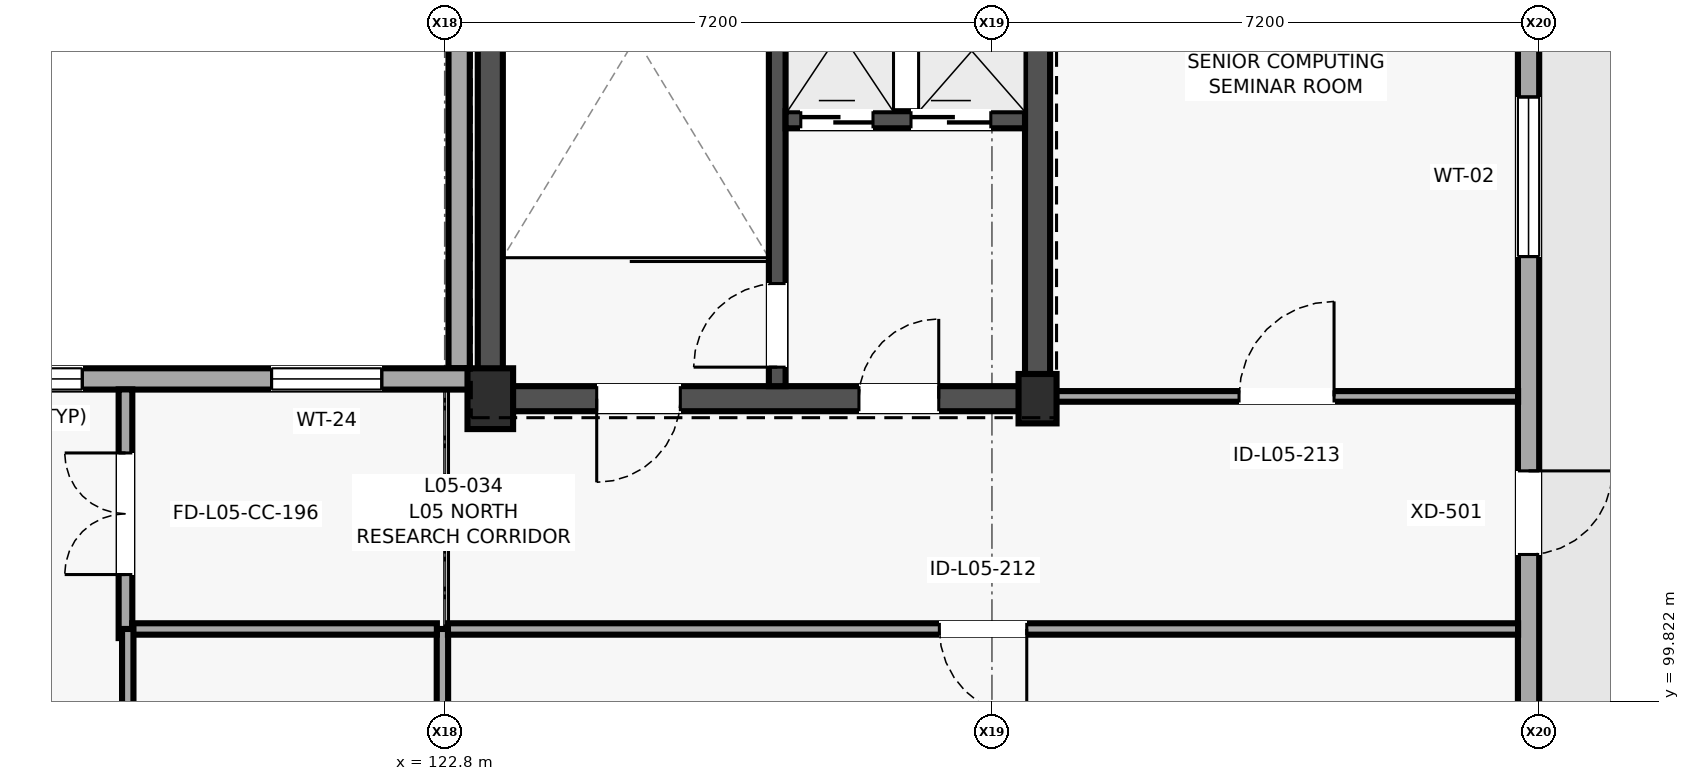
"""IFC4 building model, lengths in metres.
Left out: names, types, materials, properties, quantities, classifications, styles, units other than length and angle.
Written with IfcOpenShell. Run it as: python <this file> out.ifc"""

import sys

from ifc_helpers import new_model, si_unit, direction, frame, frame_2d, origin, origin_2d, place, context, subcontext, project, spatial, polyline, rectangle, outline, extrude, element, fill, save


model = new_model("IFC4")
c1 = context("Model", 3, precision=1e-05, world=origin(), true_north=direction((0.0, 1.0)))
c2 = subcontext(c1, "Body", "Model", "MODEL_VIEW")
j1 = project(units=[si_unit("LENGTHUNIT", "METRE"), si_unit("PLANEANGLEUNIT", "RADIAN")], contexts=[c1])
p1 = place(None, origin())
s1 = spatial("IfcSite", under=j1, at=p1, CompositionType="ELEMENT")
p2 = place(p1, origin())
s2 = spatial("IfcBuilding", under=s1, at=p2, CompositionType="ELEMENT")
p3 = place(p2, frame((0.0, 0.0, 20.2)))
s3 = spatial("IfcBuildingStorey", under=s2, at=p3, CompositionType="ELEMENT", Elevation=20.2)
p4 = place(p3, frame((123.4, 103.8, 0.0), z_axis=(0.0, 0.0, 1.0), x_axis=(1.0, 0.0, 0.0)))
e1 = element("IfcColumn", 1, at=p4, inside=s3, PredefinedType="COLUMN", context=c2, shape_type="SweptSolid", body=[
    extrude(rectangle(XDim=0.6, YDim=0.8, at=origin_2d()), origin(), (0.0, 0.0, 1.0), 4.0),
])
p5 = place(p3, frame((130.6, 103.8, 0.0), z_axis=(0.0, 0.0, 1.0), x_axis=(1.0, 0.0, 0.0)))
e2 = element("IfcColumn", 2, at=p5, inside=s3, PredefinedType="COLUMN", context=c2, shape_type="SweptSolid", body=[
    extrude(rectangle(XDim=0.5, YDim=0.65, at=origin_2d()), origin(), (0.0, 0.0, 1.0), 4.0),
])
p6 = place(p3, frame((137.06, 99.161, 0.0), z_axis=(0.0, 0.0, 1.0), x_axis=(0.0, 1.0, 0.0)))
e3 = element("IfcWall", 3, at=p6, inside=s3, PredefinedType="SOLIDWALL", context=c2, shape_type="SweptSolid", body=[
    extrude(rectangle(XDim=10.078, YDim=0.28, at=frame_2d((5.039, 0.0))), origin(), (0.0, 0.0, 1.0), 3.78),
])
p7 = place(p6, frame((2.589, 0.0, 0.0)))
e4 = element("IfcOpeningElement", 4, at=p7, cuts=e3, PredefinedType="OPENING", context=c2, shape_type="SweptSolid", body=[
    extrude(rectangle(XDim=1.1, YDim=2.15, at=frame_2d((0.55, 1.075))), frame((0.0, 0.15, 0.0), z_axis=(0.0, -1.0, 0.0), x_axis=(1.0, 0.0, 0.0)), (0.0, 0.0, 1.0), 0.3),
])
p8 = place(p6, frame((6.509, 0.0, 0.85)))
e5 = element("IfcOpeningElement", 5, at=p8, cuts=e3, PredefinedType="OPENING", context=c2, shape_type="SweptSolid", body=[
    extrude(rectangle(XDim=2.1, YDim=1.8, at=frame_2d((1.05, 0.9))), frame((0.0, 0.15, 0.0), z_axis=(0.0, -1.0, 0.0), x_axis=(1.0, 0.0, 0.0)), (0.0, 0.0, 1.0), 0.3),
])
p9 = place(p3, frame((122.99, 111.72, 0.0), z_axis=(0.0, 0.0, 1.0), x_axis=(0.0, -1.0, 0.0)))
e6 = element("IfcWall", 6, at=p9, inside=s3, PredefinedType="SOLIDWALL", context=c2, shape_type="SweptSolid", body=[
    extrude(rectangle(XDim=7.52, YDim=0.28, at=frame_2d((3.76, 0.0))), origin(), (0.0, 0.0, 1.0), 3.78),
])
p10 = place(p3, frame((123.13, 104.06, 0.0), z_axis=(0.0, 0.0, 1.0), x_axis=(-1.0, 0.0, 0.0)))
e7 = element("IfcWall", 7, at=p10, inside=s3, PredefinedType="SOLIDWALL", context=c2, shape_type="SweptSolid", body=[
    extrude(rectangle(XDim=7.53, YDim=0.28, at=frame_2d((3.765, 0.0))), origin(), (0.0, 0.0, 1.0), 3.78),
])
p11 = place(p10, frame((1.158, 0.0, 0.85)))
e8 = element("IfcOpeningElement", 8, at=p11, cuts=e7, PredefinedType="OPENING", context=c2, shape_type="SweptSolid", body=[
    extrude(rectangle(XDim=1.45, YDim=1.7, at=frame_2d((0.725, 0.85))), frame((0.0, 0.15, 0.0), z_axis=(0.0, -1.0, 0.0), x_axis=(1.0, 0.0, 0.0)), (0.0, 0.0, 1.0), 0.3),
])
p12 = place(p10, frame((5.098, 0.0, 0.75)))
e9 = element("IfcOpeningElement", 9, at=p12, cuts=e7, PredefinedType="OPENING", context=c2, shape_type="SweptSolid", body=[
    extrude(rectangle(XDim=1.1, YDim=2.1, at=frame_2d((0.55, 1.05))), frame((0.0, 0.15, 0.0), z_axis=(0.0, -1.0, 0.0), x_axis=(1.0, 0.0, 0.0)), (0.0, 0.0, 1.0), 0.3),
])
p13 = place(p3, frame((122.702, 80.045, 4.0), z_axis=(0.0, 0.0, 1.0), x_axis=(0.0, 1.0, 0.0)))
e10 = element("IfcWall", 10, at=p13, inside=s3, PredefinedType="PARAPET", context=c2, shape_type="SweptSolid", body=[
    extrude(outline(polyline([(0.0, 0.0), (23.96, 0.0), (23.96, 1.12), (16.293, 1.12), (16.243, 1.46), (7.717, 1.46), (7.667, 1.12), (0.0, 1.12), (0.0, 0.0)])), frame((0.0, 0.098, 0.0), z_axis=(0.0, -1.0, 0.0), x_axis=(1.0, 0.0, 0.0)), (0.0, 0.0, 1.0), 0.195),
])
p14 = place(p3, frame((122.799, 104.102, 4.0), z_axis=(0.0, 0.0, 1.0), x_axis=(-1.0, 0.0, 0.0)))
e11 = element("IfcWall", 11, at=p14, inside=s3, PredefinedType="PARAPET", context=c2, shape_type="SweptSolid", body=[
    extrude(rectangle(XDim=7.199, YDim=0.195, at=frame_2d((3.6, 0.0))), origin(), (0.0, 0.0, 1.0), 1.12),
])
p15 = place(p3, frame((137.102, 99.161, 4.0), z_axis=(0.0, 0.0, 1.0), x_axis=(0.0, 1.0, 0.0)))
e12 = element("IfcWall", 12, at=p15, inside=s3, PredefinedType="PARAPET", context=c2, shape_type="SweptSolid", body=[
    extrude(outline(polyline([(0.0, 0.0), (10.078, 0.0), (10.078, 1.12), (6.853, 1.12), (6.803, 1.46), (3.275, 1.46), (3.225, 1.12), (0.0, 1.12), (0.0, 0.0)])), frame((0.0, 0.098, 0.0), z_axis=(0.0, -1.0, 0.0), x_axis=(1.0, 0.0, 0.0)), (0.0, 0.0, 1.0), 0.195),
])
p16 = place(p3, frame((122.948, 111.805, 4.0), z_axis=(0.0, 0.0, 1.0), x_axis=(0.0, -1.0, 0.0)))
e13 = element("IfcWall", 13, at=p16, inside=s3, PredefinedType="PARAPET", context=c2, shape_type="SweptSolid", body=[
    extrude(outline(polyline([(0.0, 0.0), (15.209, 0.0), (15.209, 1.12), (10.342, 1.12), (10.292, 1.46), (4.917, 1.46), (4.867, 1.12), (0.0, 1.12), (0.0, 0.0)])), frame((0.0, 0.098, 0.0), z_axis=(0.0, -1.0, 0.0), x_axis=(1.0, 0.0, 0.0)), (0.0, 0.0, 1.0), 0.195),
])
p17 = place(p3, frame((123.235, 103.8, 0.0), z_axis=(0.0, 0.0, 1.0), x_axis=(1.0, 0.0, 0.0)))
e14 = element("IfcWall", 14, at=p17, inside=s3, PredefinedType="SHEAR", context=c2, shape_type="SweptSolid", body=[
    extrude(rectangle(XDim=7.53, YDim=0.33, at=frame_2d((3.765, 0.0))), origin(), (0.0, 0.0, 1.0), 4.0),
])
p18 = place(p17, frame((5.015, 0.0, 0.0)))
e15 = element("IfcOpeningElement", 15, at=p18, cuts=e14, PredefinedType="OPENING", context=c2, shape_type="SweptSolid", body=[
    extrude(rectangle(XDim=1.05, YDim=2.15, at=frame_2d((0.525, 1.075))), frame((0.0, 0.175, 0.0), z_axis=(0.0, -1.0, 0.0), x_axis=(1.0, 0.0, 0.0)), (0.0, 0.0, 1.0), 0.35),
])
p19 = place(p17, frame((1.565, 0.0, 0.0)))
e16 = element("IfcOpeningElement", 16, at=p19, cuts=e14, PredefinedType="OPENING", context=c2, shape_type="SweptSolid", body=[
    extrude(rectangle(XDim=1.1, YDim=2.15, at=frame_2d((0.55, 1.075))), frame((0.0, 0.175, 0.0), z_axis=(0.0, -1.0, 0.0), x_axis=(1.0, 0.0, 0.0)), (0.0, 0.0, 1.0), 0.35),
])
for number, where, z_axis, x_axis in (
    (17, (123.4, 103.965, 0.0), (0.0, 0.0, 1.0), (0.0, 1.0, 0.0)),
    (18, (130.6, 103.965, 0.0), (0.0, 0.0, 1.0), (0.0, 1.0, 0.0)),
):
    element("IfcWall", number, at=place(p3, frame(where, z_axis=z_axis, x_axis=x_axis)), inside=s3, PredefinedType="SHEAR", context=c2, shape_type="SweptSolid", body=[
        extrude(rectangle(XDim=7.47, YDim=0.33, at=frame_2d((3.735, 0.0))), origin(), (0.0, 0.0, 1.0), 4.0),
    ])
p20 = place(p3, frame((127.175, 103.965, 0.0), z_axis=(0.0, 0.0, 1.0), x_axis=(0.0, 1.0, 0.0)))
e19 = element("IfcWall", 19, at=p20, inside=s3, PredefinedType="SHEAR", context=c2, shape_type="SweptSolid", body=[
    extrude(rectangle(XDim=7.47, YDim=0.22, at=frame_2d((3.735, 0.0))), origin(), (0.0, 0.0, 1.0), 4.0),
])
p21 = place(p20, frame((0.25, 0.0, 0.0)))
e20 = element("IfcOpeningElement", 20, at=p21, cuts=e19, PredefinedType="OPENING", context=c2, shape_type="SweptSolid", body=[
    extrude(rectangle(XDim=1.1, YDim=2.15, at=frame_2d((0.55, 1.075))), frame((0.0, 0.12, 0.0), z_axis=(0.0, -1.0, 0.0), x_axis=(1.0, 0.0, 0.0)), (0.0, 0.0, 1.0), 0.24),
])
p22 = place(p3, frame((127.285, 107.47, 0.0), z_axis=(0.0, 0.0, 1.0), x_axis=(1.0, 0.0, 0.0)))
e21 = element("IfcWall", 21, at=p22, inside=s3, PredefinedType="SHEAR", context=c2, shape_type="SweptSolid", body=[
    extrude(rectangle(XDim=3.15, YDim=0.225, at=frame_2d((1.575, 0.0))), origin(), (0.0, 0.0, 1.0), 4.0),
])
p23 = place(p22, frame((0.2, 0.0, 0.0)))
e22 = element("IfcOpeningElement", 22, at=p23, cuts=e21, PredefinedType="OPENING", context=c2, shape_type="SweptSolid", body=[
    extrude(rectangle(XDim=0.95, YDim=2.15, at=frame_2d((0.475, 1.075))), frame((0.0, 0.123, 0.0), z_axis=(0.0, -1.0, 0.0), x_axis=(1.0, 0.0, 0.0)), (0.0, 0.0, 1.0), 0.245),
])
p24 = place(p22, frame((1.65, 0.0, 0.0)))
e23 = element("IfcOpeningElement", 23, at=p24, cuts=e21, PredefinedType="OPENING", context=c2, shape_type="SweptSolid", body=[
    extrude(rectangle(XDim=1.05, YDim=2.2, at=frame_2d((0.525, 1.1))), frame((0.0, 0.123, 0.0), z_axis=(0.0, -1.0, 0.0), x_axis=(1.0, 0.0, 0.0)), (0.0, 0.0, 1.0), 0.245),
])
p25 = place(p3, frame((126.955, 107.41, 4.0), z_axis=(0.0, 0.0, 1.0), x_axis=(1.0, 0.0, 0.0)))
e24 = element("IfcWall", 24, at=p25, inside=s3, PredefinedType="SHEAR", context=c2, shape_type="SweptSolid", body=[
    extrude(rectangle(XDim=3.81, YDim=0.33, at=frame_2d((1.905, 0.0))), origin(), (0.0, 0.0, 1.0), 0.96),
])
for number, where, z_axis, x_axis in (
    (25, (127.12, 107.575, 4.0), (0.0, 0.0, 1.0), (0.0, 1.0, 0.0)),
    (26, (130.6, 107.575, 4.0), (0.0, 0.0, 1.0), (0.0, 1.0, 0.0)),
):
    element("IfcWall", number, at=place(p3, frame(where, z_axis=z_axis, x_axis=x_axis)), inside=s3, PredefinedType="SHEAR", context=c2, shape_type="SweptSolid", body=[
        extrude(rectangle(XDim=3.86, YDim=0.33, at=frame_2d((1.93, 0.0))), origin(), (0.0, 0.0, 1.0), 0.96),
    ])
p26 = place(p3, frame((118.6, 100.65, 0.0), z_axis=(0.0, 0.0, 1.0), x_axis=(0.0, 1.0, 0.0)))
e27 = element("IfcWall", 27, at=p26, inside=s3, PredefinedType="PARTITIONING", context=c2, shape_type="SweptSolid", body=[
    extrude(rectangle(XDim=3.272, YDim=0.18, at=frame_2d((1.636, 0.0))), origin(), (0.0, 0.0, 1.0), 3.78),
])
p27 = place(p26, frame((0.836, 0.0, 0.0)))
e28 = element("IfcOpeningElement", 28, at=p27, cuts=e27, PredefinedType="OPENING", context=c2, shape_type="SweptSolid", body=[
    extrude(rectangle(XDim=1.6, YDim=2.25, at=frame_2d((0.8, 1.125))), frame((0.0, 0.1, 0.0), z_axis=(0.0, -1.0, 0.0), x_axis=(1.0, 0.0, 0.0)), (0.0, 0.0, 1.0), 0.2),
])
p28 = place(p3, frame((122.77, 96.678, 0.0), z_axis=(0.0, 0.0, 1.0), x_axis=(0.0, 1.0, 0.0)))
e29 = element("IfcWall", 29, at=p28, inside=s3, PredefinedType="PARTITIONING", context=c2, shape_type="SweptSolid", body=[
    extrude(rectangle(XDim=4.092, YDim=0.15, at=frame_2d((2.046, 0.0))), origin(), (0.0, 0.0, 1.0), 3.755),
])
p29 = place(p3, frame((122.697, 100.77, 0.0), z_axis=(0.0, 0.0, 1.0), x_axis=(-1.0, 0.0, 0.0)))
e30 = element("IfcWall", 30, at=p29, inside=s3, PredefinedType="PARTITIONING", context=c2, shape_type="SweptSolid", body=[
    extrude(rectangle(XDim=4.009, YDim=0.15, at=frame_2d((2.004, 0.0))), origin(), (0.0, 0.0, 1.0), 3.755),
])
p30 = place(p3, frame((118.63, 100.77, 0.0), z_axis=(0.0, 0.0, 1.0), x_axis=(0.0, -1.0, 0.0)))
e31 = element("IfcWall", 31, at=p30, inside=s3, PredefinedType="PARTITIONING", context=c2, shape_type="SweptSolid", body=[
    extrude(rectangle(XDim=10.922, YDim=0.15, at=frame_2d((5.461, 0.0))), origin(), (0.0, 0.0, 1.0), 3.205),
])
p31 = place(p30, frame((4.886, 0.0, 0.0)))
e32 = element("IfcOpeningElement", 32, at=p31, cuts=e31, PredefinedType="OPENING", context=c2, shape_type="SweptSolid", body=[
    extrude(rectangle(XDim=1.15, YDim=2.2, at=frame_2d((0.575, 1.1))), frame((0.0, 0.085, 0.0), z_axis=(0.0, -1.0, 0.0), x_axis=(1.0, 0.0, 0.0)), (0.0, 0.0, 1.0), 0.17),
])
p32 = place(p3, frame((136.922, 100.77, 0.0), z_axis=(0.0, 0.0, 1.0), x_axis=(-1.0, 0.0, 0.0)))
e33 = element("IfcWall", 33, at=p32, inside=s3, PredefinedType="PARTITIONING", context=c2, shape_type="SweptSolid", body=[
    extrude(rectangle(XDim=14.079, YDim=0.15, at=frame_2d((7.04, 0.0))), origin(), (0.0, 0.0, 1.0), 3.755),
])
p33 = place(p32, frame((6.464, 0.0, 0.0)))
e34 = element("IfcOpeningElement", 34, at=p33, cuts=e33, PredefinedType="OPENING", context=c2, shape_type="SweptSolid", body=[
    extrude(rectangle(XDim=1.15, YDim=2.2, at=frame_2d((0.575, 1.1))), frame((0.0, 0.085, 0.0), z_axis=(0.0, -1.0, 0.0), x_axis=(1.0, 0.0, 0.0)), (0.0, 0.0, 1.0), 0.17),
])
p34 = place(p3, frame((130.83, 103.83, 0.0), z_axis=(0.0, 0.0, 1.0), x_axis=(1.0, 0.0, 0.0)))
e35 = element("IfcWall", 35, at=p34, inside=s3, PredefinedType="PARTITIONING", context=c2, shape_type="SweptSolid", body=[
    extrude(rectangle(XDim=6.092, YDim=0.14, at=frame_2d((3.046, 0.0))), origin(), (0.0, 0.0, 1.0), 3.755),
])
p35 = place(p34, frame((2.421, 0.0, 0.0)))
e36 = element("IfcOpeningElement", 36, at=p35, cuts=e35, PredefinedType="OPENING", context=c2, shape_type="SweptSolid", body=[
    extrude(rectangle(XDim=1.25, YDim=2.22, at=frame_2d((0.625, 1.11))), frame((0.0, 0.08, 0.0), z_axis=(0.0, -1.0, 0.0), x_axis=(1.0, 0.0, 0.0)), (0.0, 0.0, 1.0), 0.16),
])
p36 = place(p7, frame((1.1, 0.0, 0.0), z_axis=(0.0, 0.0, 1.0), x_axis=(-1.0, 0.0, 0.0)))
e37 = element("IfcDoor", 37, at=p36, inside=s3, OperationType="SINGLE_SWING_RIGHT", PredefinedType="DOOR", context=c2, shape_type="SweptSolid", body=[
    extrude(rectangle(XDim=1.1, YDim=2.15, at=frame_2d((0.55, 1.075))), frame((0.0, 0.025, 0.0), z_axis=(0.0, -1.0, 0.0), x_axis=(1.0, 0.0, 0.0)), (0.0, 0.0, 1.0), 0.05),
])
fill(e4, e37)
p37 = place(p8, origin())
e38 = element("IfcWindow", 38, at=p37, inside=s3, PartitioningType="SINGLE_PANEL", PredefinedType="WINDOW", context=c2, shape_type="SweptSolid", body=[
    extrude(rectangle(XDim=2.1, YDim=1.8, at=frame_2d((1.05, 0.9))), frame((0.0, 0.03, 0.0), z_axis=(0.0, -1.0, 0.0), x_axis=(1.0, 0.0, 0.0)), (0.0, 0.0, 1.0), 0.06),
])
fill(e5, e38)
p38 = place(p11, origin())
e39 = element("IfcWindow", 39, at=p38, inside=s3, PartitioningType="SINGLE_PANEL", PredefinedType="WINDOW", context=c2, shape_type="SweptSolid", body=[
    extrude(rectangle(XDim=1.45, YDim=1.7, at=frame_2d((0.725, 0.85))), frame((0.0, 0.03, 0.0), z_axis=(0.0, -1.0, 0.0), x_axis=(1.0, 0.0, 0.0)), (0.0, 0.0, 1.0), 0.06),
])
fill(e8, e39)
p39 = place(p12, origin())
e40 = element("IfcWindow", 40, at=p39, inside=s3, PartitioningType="SINGLE_PANEL", PredefinedType="WINDOW", context=c2, shape_type="SweptSolid", body=[
    extrude(rectangle(XDim=1.1, YDim=2.1, at=frame_2d((0.55, 1.05))), frame((0.0, 0.03, 0.0), z_axis=(0.0, -1.0, 0.0), x_axis=(1.0, 0.0, 0.0)), (0.0, 0.0, 1.0), 0.06),
])
fill(e9, e40)
p40 = place(p23, origin())
e41 = element("IfcDoor", 41, at=p40, inside=s3, OperationType="SLIDING_TO_LEFT", PredefinedType="DOOR", context=c2, shape_type="SweptSolid", body=[
    extrude(rectangle(XDim=0.95, YDim=2.15, at=frame_2d((0.475, 1.075))), frame((0.0, 0.025, 0.0), z_axis=(0.0, -1.0, 0.0), x_axis=(1.0, 0.0, 0.0)), (0.0, 0.0, 1.0), 0.05),
])
fill(e22, e41)
p41 = place(p24, origin())
e42 = element("IfcDoor", 42, at=p41, inside=s3, OperationType="SLIDING_TO_RIGHT", PredefinedType="DOOR", context=c2, shape_type="SweptSolid", body=[
    extrude(rectangle(XDim=1.05, YDim=2.2, at=frame_2d((0.525, 1.1))), frame((0.0, 0.025, 0.0), z_axis=(0.0, -1.0, 0.0), x_axis=(1.0, 0.0, 0.0)), (0.0, 0.0, 1.0), 0.05),
])
fill(e23, e42)
p42 = place(p21, origin())
e43 = element("IfcDoor", 43, at=p42, inside=s3, OperationType="SINGLE_SWING_LEFT", PredefinedType="DOOR", context=c2, shape_type="SweptSolid", body=[
    extrude(rectangle(XDim=1.1, YDim=2.15, at=frame_2d((0.55, 1.075))), frame((0.0, 0.025, 0.0), z_axis=(0.0, -1.0, 0.0), x_axis=(1.0, 0.0, 0.0)), (0.0, 0.0, 1.0), 0.05),
])
fill(e20, e43)
p43 = place(p18, origin())
e44 = element("IfcDoor", 44, at=p43, inside=s3, OperationType="SINGLE_SWING_RIGHT", PredefinedType="DOOR", context=c2, shape_type="SweptSolid", body=[
    extrude(rectangle(XDim=1.05, YDim=2.15, at=frame_2d((0.525, 1.075))), frame((0.0, 0.025, 0.0), z_axis=(0.0, -1.0, 0.0), x_axis=(1.0, 0.0, 0.0)), (0.0, 0.0, 1.0), 0.05),
])
fill(e15, e44)
p44 = place(p19, frame((1.1, 0.0, 0.0), z_axis=(0.0, 0.0, 1.0), x_axis=(-1.0, 0.0, 0.0)))
e45 = element("IfcDoor", 45, at=p44, inside=s3, OperationType="SINGLE_SWING_LEFT", PredefinedType="DOOR", context=c2, shape_type="SweptSolid", body=[
    extrude(rectangle(XDim=1.1, YDim=2.15, at=frame_2d((0.55, 1.075))), frame((0.0, 0.025, 0.0), z_axis=(0.0, -1.0, 0.0), x_axis=(1.0, 0.0, 0.0)), (0.0, 0.0, 1.0), 0.05),
])
fill(e16, e45)
p45 = place(p27, origin())
e46 = element("IfcDoor", 46, at=p45, inside=s3, OperationType="DOUBLE_DOOR_SINGLE_SWING", PredefinedType="DOOR", context=c2, shape_type="SweptSolid", body=[
    extrude(rectangle(XDim=1.6, YDim=2.25, at=frame_2d((0.8, 1.125))), frame((0.0, 0.025, 0.0), z_axis=(0.0, -1.0, 0.0), x_axis=(1.0, 0.0, 0.0)), (0.0, 0.0, 1.0), 0.05),
])
fill(e28, e46)
p46 = place(p33, origin())
e47 = element("IfcDoor", 47, at=p46, inside=s3, OperationType="SINGLE_SWING_LEFT", PredefinedType="DOOR", context=c2, shape_type="SweptSolid", body=[
    extrude(rectangle(XDim=1.15, YDim=2.2, at=frame_2d((0.575, 1.1))), frame((0.0, 0.025, 0.0), z_axis=(0.0, -1.0, 0.0), x_axis=(1.0, 0.0, 0.0)), (0.0, 0.0, 1.0), 0.05),
])
fill(e34, e47)
p47 = place(p35, origin())
e48 = element("IfcDoor", 48, at=p47, inside=s3, OperationType="SINGLE_SWING_RIGHT", PredefinedType="DOOR", context=c2, shape_type="SweptSolid", body=[
    extrude(rectangle(XDim=1.25, YDim=2.22, at=frame_2d((0.625, 1.11))), frame((0.0, 0.025, 0.0), z_axis=(0.0, -1.0, 0.0), x_axis=(1.0, 0.0, 0.0)), (0.0, 0.0, 1.0), 0.05),
])
fill(e36, e48)
save(model, sys.argv[1])
